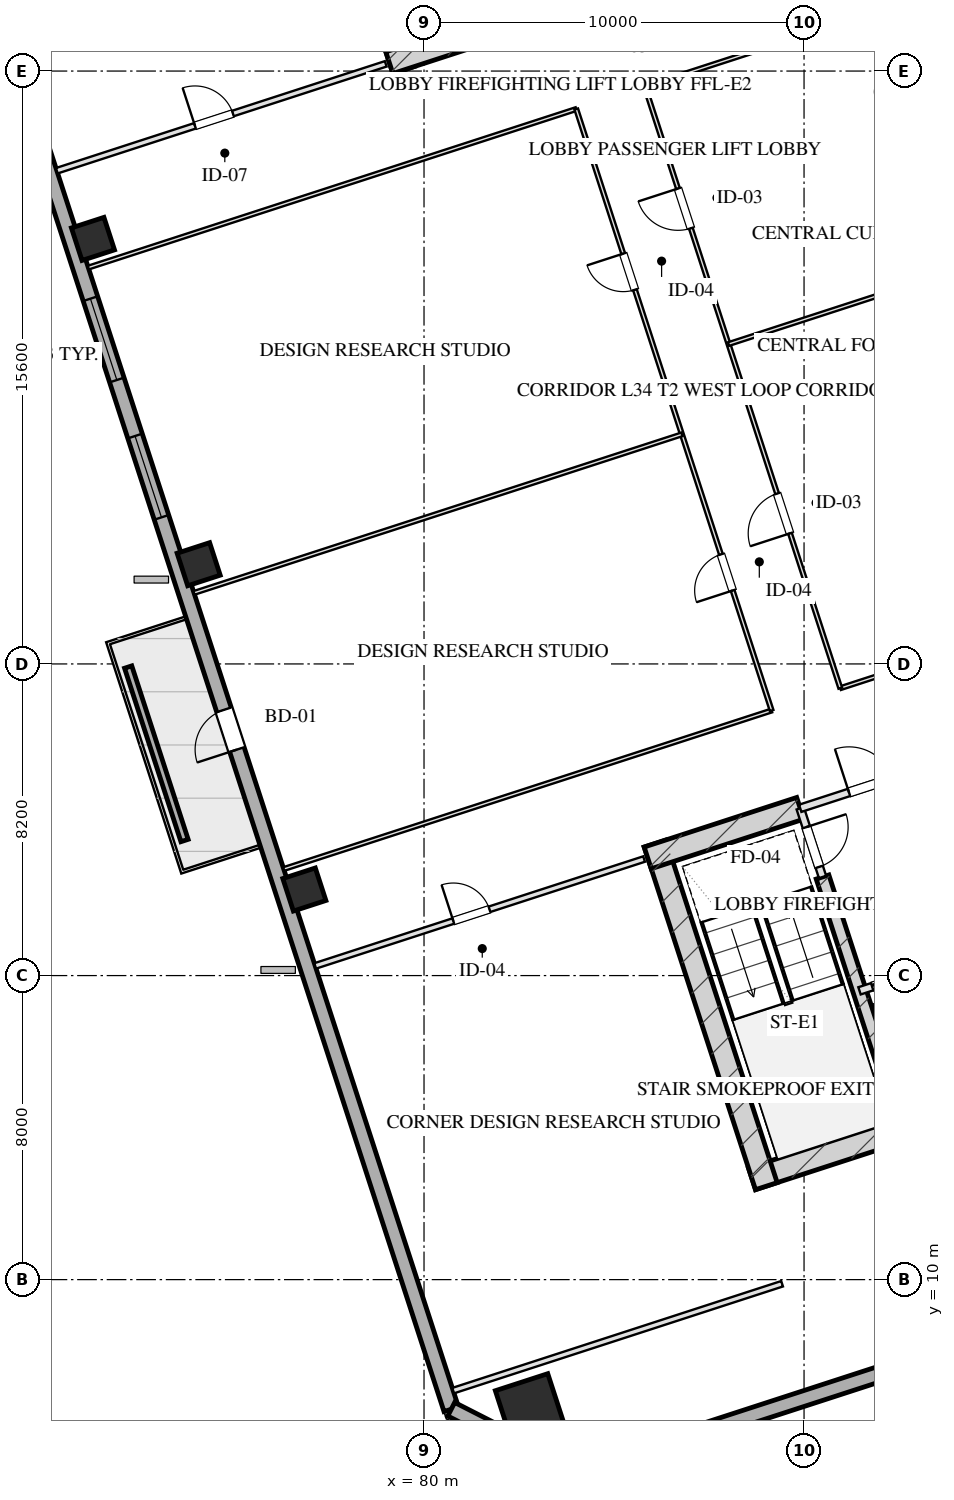
"""IFC4 building model, lengths in metres.
Left out: names, types, materials, properties, quantities, classifications, styles, units other than length and angle.
Written with IfcOpenShell. Run it as: python <this file> out.ifc"""

import sys

from ifc_helpers import new_model, si_unit, direction, frame, frame_2d, origin, origin_2d, place, context, subcontext, project, spatial, rectangle, hollow_rectangle, extrude, element, fill, save


model = new_model("IFC4")
c1 = context("Model", 3, precision=1e-05, world=origin(), true_north=direction((0.0, 1.0)))
c2 = subcontext(c1, "Body", "Model", "MODEL_VIEW")
j1 = project(units=[si_unit("LENGTHUNIT", "METRE"), si_unit("PLANEANGLEUNIT", "RADIAN")], contexts=[c1])
p1 = place(None, origin())
s1 = spatial("IfcSite", under=j1, at=p1, CompositionType="ELEMENT")
p2 = place(p1, origin())
s2 = spatial("IfcBuilding", under=s1, at=p2, CompositionType="ELEMENT")
p3 = place(p2, frame((0.0, 0.0, 131.1)))
s3 = spatial("IfcBuildingStorey", under=s2, at=p3, CompositionType="ELEMENT", Elevation=131.1)
p4 = place(p3, frame((88.63, 12.652, 0.0), z_axis=(0.0, 0.0, 1.0), x_axis=(0.95105714907, 0.309015046886, 0.0)))
e1 = element("IfcWall", 1, at=p4, inside=s3, PredefinedType="SHEAR", context=c2, shape_type="SweptSolid", body=[
    extrude(rectangle(XDim=16.4, YDim=0.6, at=frame_2d((8.2, 0.0))), origin(), (0.0, 0.0, 1.0), 3.45),
])
p5 = place(p3, frame((86.078, 21.475, 0.0), z_axis=(0.0, 0.0, 1.0), x_axis=(0.309017938678, -0.951056209472, 0.0)))
e2 = element("IfcWall", 2, at=p5, inside=s3, PredefinedType="SHEAR", context=c2, shape_type="SweptSolid", body=[
    extrude(rectangle(XDim=9.48, YDim=0.6, at=frame_2d((4.74, 0.0))), origin(), (0.0, 0.0, 1.0), 3.45),
])
p6 = place(p3, frame((90.486, 20.594, 0.0), z_axis=(0.0, 0.0, 1.0), x_axis=(0.309020428229, -0.951055400562, 0.0)))
e3 = element("IfcWall", 3, at=p6, inside=s3, PredefinedType="SHEAR", context=c2, shape_type="SweptSolid", body=[
    extrude(rectangle(XDim=6.98, YDim=0.35, at=frame_2d((3.49, 0.0))), origin(), (0.0, 0.0, 1.0), 3.45),
])
p7 = place(p3, frame((85.886, 21.097, 0.0), z_axis=(0.0, 0.0, 1.0), x_axis=(0.951068073652, 0.308981422225, 0.0)))
e4 = element("IfcWall", 4, at=p7, inside=s3, PredefinedType="SHEAR", context=c2, shape_type="SweptSolid", body=[
    extrude(rectangle(XDim=4.22, YDim=0.6, at=frame_2d((2.11, 0.0))), origin(), (0.0, 0.0, 1.0), 3.45),
])
p8 = place(p3, frame((79.466, 41.828, 0.0), z_axis=(0.0, 0.0, 1.0), x_axis=(-0.309041232772, 0.951048640421, 0.0)))
e5 = element("IfcWall", 5, at=p8, inside=s3, PredefinedType="SHEAR", context=c2, shape_type="SweptSolid", body=[
    extrude(rectangle(XDim=9.48, YDim=0.6, at=frame_2d((4.74, 0.0))), origin(), (0.0, 0.0, 1.0), 3.45),
])
p9 = place(p3, frame((79.087, 42.021, 0.0), z_axis=(0.0, 0.0, 1.0), x_axis=(0.951062550203, 0.3089984233, 0.0)))
e6 = element("IfcWall", 6, at=p9, inside=s3, PredefinedType="SHEAR", context=c2, shape_type="SweptSolid", body=[
    extrude(rectangle(XDim=4.22, YDim=0.6, at=frame_2d((2.11, 0.0))), origin(), (0.0, 0.0, 1.0), 3.45),
])
p10 = place(p3, frame((82.791, 6.612, 0.0), z_axis=(0.0, 0.0, 1.0), x_axis=(0.951056516295, 0.309016994375, 0.0)))
e7 = element("IfcColumn", 7, at=p10, inside=s3, PredefinedType="COLUMN", context=c2, shape_type="SweptSolid", body=[
    extrude(hollow_rectangle(XDim=1.45, YDim=1.45, WallThickness=0.05, at=origin_2d()), origin(), (0.0, 0.0, 1.0), 3.451),
])
for number, where, z_axis, x_axis in (
    (8, (76.851, 20.264, 0.0), (0.0, 0.0, 1.0), (0.951, 0.309, 0.0)),
    (9, (74.07, 28.824, 0.0), (0.0, 0.0, 1.0), (0.951, 0.309, 0.0)),
    (10, (71.289, 37.384, 0.0), (0.0, 0.0, 1.0), (0.951, 0.309, 0.0)),
):
    element("IfcColumn", number, at=place(p3, frame(where, z_axis=z_axis, x_axis=x_axis)), inside=s3, PredefinedType="COLUMN", context=c2, shape_type="SweptSolid", body=[
        extrude(hollow_rectangle(XDim=0.9, YDim=0.9, WallThickness=0.032, at=origin_2d()), origin(), (0.0, 0.0, 1.0), 3.451),
    ])
p11 = place(p3, frame((80.716, 6.59, 0.0), z_axis=(0.0, 0.0, 1.0), x_axis=(-0.309017542002, 0.95105633836, 0.0)))
e11 = element("IfcWall", 11, at=p11, inside=s3, PredefinedType="SOLIDWALL", context=c2, shape_type="SweptSolid", body=[
    extrude(rectangle(XDim=46.4, YDim=0.4, at=frame_2d((23.2, 0.0))), origin(), (0.0, 0.0, 1.0), 2.61),
])
p12 = place(p11, frame((24.675, 0.0, 0.75)))
e12 = element("IfcOpeningElement", 12, at=p12, cuts=e11, PredefinedType="OPENING", context=c2, shape_type="SweptSolid", body=[
    extrude(rectangle(XDim=2.25, YDim=1.46, at=frame_2d((1.125, 0.73))), frame((0.0, 0.21, 0.0), z_axis=(0.0, -1.0, 0.0), x_axis=(1.0, 0.0, 0.0)), (0.0, 0.0, 1.0), 0.42),
])
p13 = place(p11, frame((28.475, 0.0, 0.75)))
e13 = element("IfcOpeningElement", 13, at=p13, cuts=e11, PredefinedType="OPENING", context=c2, shape_type="SweptSolid", body=[
    extrude(rectangle(XDim=2.25, YDim=1.46, at=frame_2d((1.125, 0.73))), frame((0.0, 0.21, 0.0), z_axis=(0.0, -1.0, 0.0), x_axis=(1.0, 0.0, 0.0)), (0.0, 0.0, 1.0), 0.42),
])
p14 = place(p11, frame((18.25, 0.0, 0.0)))
e14 = element("IfcOpeningElement", 14, at=p14, cuts=e11, PredefinedType="OPENING", context=c2, shape_type="SweptSolid", body=[
    extrude(rectangle(XDim=1.1, YDim=2.15, at=frame_2d((0.55, 1.075))), frame((0.0, 0.21, 0.0), z_axis=(0.0, -1.0, 0.0), x_axis=(1.0, 0.0, 0.0)), (0.0, 0.0, 1.0), 0.42),
])
p15 = place(p3, frame((111.953, 14.005, 0.0), z_axis=(0.0, 0.0, 1.0), x_axis=(-0.95105505922, -0.309021478754, 0.0)))
e15 = element("IfcWall", 15, at=p15, inside=s3, PredefinedType="SOLIDWALL", context=c2, shape_type="SweptSolid", body=[
    extrude(rectangle(XDim=29.4, YDim=0.4, at=frame_2d((14.7, 0.0))), origin(), (0.0, 0.0, 1.0), 2.61),
])
p16 = place(p3, frame((83.992, 4.92, 0.0), z_axis=(0.0, 0.0, 1.0), x_axis=(-0.891001999643, 0.45399937955, 0.0)))
e16 = element("IfcWall", 16, at=p16, inside=s3, PredefinedType="SOLIDWALL", context=c2, shape_type="SweptSolid", body=[
    extrude(rectangle(XDim=3.677, YDim=0.4, at=frame_2d((1.839, 0.0))), origin(), (0.0, 0.0, 1.0), 2.61),
])
p17 = place(p3, frame((73.698, 21.553, 0.0), z_axis=(0.0, 0.0, 1.0), x_axis=(-0.309032019345, 0.951051634255, 0.0)))
e17 = element("IfcWall", 17, at=p17, inside=s3, PredefinedType="PARAPET", context=c2, shape_type="SweptSolid", body=[
    extrude(rectangle(XDim=4.8, YDim=0.2, at=frame_2d((2.4, 0.0))), origin(), (0.0, 0.0, 1.0), 0.75),
])
p18 = place(p3, frame((89.899, 22.401, 0.0), z_axis=(0.0, 0.0, 1.0), x_axis=(0.308932062672, -0.951084108086, 0.0)))
e18 = element("IfcWall", 18, at=p18, inside=s3, PredefinedType="PARTITIONING", context=c2, shape_type="SweptSolid", body=[
    extrude(rectangle(XDim=1.9, YDim=0.2, at=frame_2d((0.95, 0.0))), origin(), (0.0, 0.0, 1.0), 3.175),
])
p19 = place(p18, frame((0.52, 0.0, 0.0)))
e19 = element("IfcOpeningElement", 19, at=p19, cuts=e18, PredefinedType="OPENING", context=c2, shape_type="SweptSolid", body=[
    extrude(rectangle(XDim=1.1, YDim=2.05, at=frame_2d((0.55, 1.025))), frame((0.0, 0.11, 0.0), z_axis=(0.0, -1.0, 0.0), x_axis=(1.0, 0.0, 0.0)), (0.0, 0.0, 1.0), 0.22),
])
p20 = place(p3, frame((89.899, 22.401, 0.0), z_axis=(0.0, 0.0, 1.0), x_axis=(0.951046716504, 0.309047153403, 0.0)))
e20 = element("IfcWall", 20, at=p20, inside=s3, PredefinedType="PARTITIONING", context=c2, shape_type="SweptSolid", body=[
    extrude(rectangle(XDim=3.83, YDim=0.2, at=frame_2d((1.915, 0.0))), origin(), (0.0, 0.0, 1.0), 3.175),
])
p21 = place(p20, frame((1.35, 0.0, 0.0)))
e21 = element("IfcOpeningElement", 21, at=p21, cuts=e20, PredefinedType="OPENING", context=c2, shape_type="SweptSolid", body=[
    extrude(rectangle(XDim=1.2, YDim=2.05, at=frame_2d((0.6, 1.025))), frame((0.0, 0.11, 0.0), z_axis=(0.0, -1.0, 0.0), x_axis=(1.0, 0.0, 0.0)), (0.0, 0.0, 1.0), 0.22),
])
p22 = place(p3, frame((91.46, 17.598, 0.0), z_axis=(0.0, 0.0, 1.0), x_axis=(0.951062257173, 0.308999325213, 0.0)))
e22 = element("IfcWall", 22, at=p22, inside=s3, PredefinedType="PARTITIONING", context=c2, shape_type="SweptSolid", body=[
    extrude(rectangle(XDim=2.1, YDim=0.2, at=frame_2d((1.05, 0.0))), origin(), (0.0, 0.0, 1.0), 3.175),
])
p23 = place(p22, frame((0.35, 0.0, 0.0)))
e23 = element("IfcOpeningElement", 23, at=p23, cuts=e22, PredefinedType="OPENING", context=c2, shape_type="SweptSolid", body=[
    extrude(rectangle(XDim=1.1, YDim=2.05, at=frame_2d((0.55, 1.025))), frame((0.0, 0.11, 0.0), z_axis=(0.0, -1.0, 0.0), x_axis=(1.0, 0.0, 0.0)), (0.0, 0.0, 1.0), 0.22),
])
p24 = place(p3, frame((80.767, 7.079, 0.0), z_axis=(0.0, 0.0, 1.0), x_axis=(0.951057133767, 0.309015093986, 0.0)))
e24 = element("IfcWall", 24, at=p24, inside=s3, PredefinedType="PARTITIONING", context=c2, shape_type="SweptSolid", body=[
    extrude(rectangle(XDim=9.1, YDim=0.15, at=frame_2d((4.55, 0.0))), origin(), (0.0, 0.0, 1.0), 3.175),
])
p25 = place(p3, frame((77.136, 18.254, 0.0), z_axis=(0.0, 0.0, 1.0), x_axis=(0.951057133767, 0.309015093986, 0.0)))
e25 = element("IfcWall", 25, at=p25, inside=s3, PredefinedType="PARTITIONING", context=c2, shape_type="SweptSolid", body=[
    extrude(rectangle(XDim=9.1, YDim=0.15, at=frame_2d((4.55, 0.0))), origin(), (0.0, 0.0, 1.0), 2.15),
])
p26 = place(p25, frame((3.822, 0.0, 0.0)))
e26 = element("IfcOpeningElement", 26, at=p26, cuts=e25, PredefinedType="OPENING", context=c2, shape_type="SweptSolid", body=[
    extrude(rectangle(XDim=1.0, YDim=2.05, at=frame_2d((0.5, 1.025))), frame((0.0, 0.085, 0.0), z_axis=(0.0, -1.0, 0.0), x_axis=(1.0, 0.0, 0.0)), (0.0, 0.0, 1.0), 0.17),
])
p27 = place(p3, frame((70.338, 39.177, 0.0), z_axis=(0.0, 0.0, 1.0), x_axis=(0.951059695568, 0.309007209409, 0.0)))
e27 = element("IfcWall", 27, at=p27, inside=s3, PredefinedType="PARTITIONING", context=c2, shape_type="SweptSolid", body=[
    extrude(rectangle(XDim=9.1, YDim=0.15, at=frame_2d((4.55, 0.0))), origin(), (0.0, 0.0, 1.0), 2.15),
])
p28 = place(p27, frame((3.822, 0.0, 0.0)))
e28 = element("IfcOpeningElement", 28, at=p28, cuts=e27, PredefinedType="OPENING", context=c2, shape_type="SweptSolid", body=[
    extrude(rectangle(XDim=1.05, YDim=2.05, at=frame_2d((0.525, 1.025))), frame((0.0, 0.085, 0.0), z_axis=(0.0, -1.0, 0.0), x_axis=(1.0, 0.0, 0.0)), (0.0, 0.0, 1.0), 0.17),
])
p29 = place(p3, frame((76.308, 20.803, 0.0), z_axis=(0.0, 0.0, 1.0), x_axis=(0.951054001411, 0.309024734286, 0.0)))
e29 = element("IfcWall", 29, at=p29, inside=s3, PredefinedType="MOVABLE", context=c2, shape_type="SweptSolid", body=[
    extrude(rectangle(XDim=13.5, YDim=0.1, at=frame_2d((6.75, 0.0))), origin(), (0.0, 0.0, 1.0), 3.175),
])
p30 = place(p3, frame((90.954, 25.562, 0.0), z_axis=(0.0, 0.0, 1.0), x_axis=(0.951052398814, 0.309029666393, 0.0)))
e30 = element("IfcWall", 30, at=p30, inside=s3, PredefinedType="MOVABLE", context=c2, shape_type="SweptSolid", body=[
    extrude(rectangle(XDim=9.2, YDim=0.1, at=frame_2d((4.6, 0.0))), origin(), (0.0, 0.0, 1.0), 3.175),
])
p31 = place(p3, frame((71.166, 36.629, 0.0), z_axis=(0.0, 0.0, 1.0), x_axis=(0.951057589409, 0.309013691651, 0.0)))
e31 = element("IfcWall", 31, at=p31, inside=s3, PredefinedType="MOVABLE", context=c2, shape_type="SweptSolid", body=[
    extrude(rectangle(XDim=13.5, YDim=0.1, at=frame_2d((6.75, 0.0))), origin(), (0.0, 0.0, 1.0), 3.175),
])
p32 = place(p3, frame((85.812, 41.387, 0.0), z_axis=(0.0, 0.0, 1.0), x_axis=(0.951054933035, 0.309021867106, 0.0)))
e32 = element("IfcWall", 32, at=p32, inside=s3, PredefinedType="MOVABLE", context=c2, shape_type="SweptSolid", body=[
    extrude(rectangle(XDim=9.2, YDim=0.1, at=frame_2d((4.6, 0.0))), origin(), (0.0, 0.0, 1.0), 3.175),
])
p33 = place(p3, frame((89.147, 24.975, 0.0), z_axis=(0.0, 0.0, 1.0), x_axis=(-0.309022042254, 0.951054876125, 0.0)))
e33 = element("IfcWall", 33, at=p33, inside=s3, PredefinedType="MOVABLE", context=c2, shape_type="SweptSolid", body=[
    extrude(rectangle(XDim=16.64, YDim=0.1, at=frame_2d((8.32, 0.0))), origin(), (0.0, 0.0, 1.0), 3.175),
])
p34 = place(p33, frame((3.32, 0.0, 0.0)))
e34 = element("IfcOpeningElement", 34, at=p34, cuts=e33, PredefinedType="OPENING", context=c2, shape_type="SweptSolid", body=[
    extrude(rectangle(XDim=1.0, YDim=2.05, at=frame_2d((0.5, 1.025))), frame((0.0, 0.06, 0.0), z_axis=(0.0, -1.0, 0.0), x_axis=(1.0, 0.0, 0.0)), (0.0, 0.0, 1.0), 0.12),
])
p35 = place(p33, frame((11.64, 0.0, 0.0)))
e35 = element("IfcOpeningElement", 35, at=p35, cuts=e33, PredefinedType="OPENING", context=c2, shape_type="SweptSolid", body=[
    extrude(rectangle(XDim=1.0, YDim=2.05, at=frame_2d((0.5, 1.025))), frame((0.0, 0.06, 0.0), z_axis=(0.0, -1.0, 0.0), x_axis=(1.0, 0.0, 0.0)), (0.0, 0.0, 1.0), 0.12),
])
p36 = place(p3, frame((90.954, 25.562, 0.0), z_axis=(0.0, 0.0, 1.0), x_axis=(-0.30901773025, 0.951056277195, 0.0)))
e36 = element("IfcWall", 36, at=p36, inside=s3, PredefinedType="MOVABLE", context=c2, shape_type="SweptSolid", body=[
    extrude(rectangle(XDim=16.64, YDim=0.1, at=frame_2d((8.32, 0.0))), origin(), (0.0, 0.0, 1.0), 3.175),
])
p37 = place(p36, frame((4.284, 0.0, 0.0)))
e37 = element("IfcOpeningElement", 37, at=p37, cuts=e36, PredefinedType="OPENING", context=c2, shape_type="SweptSolid", body=[
    extrude(rectangle(XDim=1.1, YDim=2.05, at=frame_2d((0.55, 1.025))), frame((0.0, 0.06, 0.0), z_axis=(0.0, -1.0, 0.0), x_axis=(1.0, 0.0, 0.0)), (0.0, 0.0, 1.0), 0.12),
])
p38 = place(p36, frame((12.724, 0.0, 0.0)))
e38 = element("IfcOpeningElement", 38, at=p38, cuts=e36, PredefinedType="OPENING", context=c2, shape_type="SweptSolid", body=[
    extrude(rectangle(XDim=1.1, YDim=2.05, at=frame_2d((0.55, 1.025))), frame((0.0, 0.06, 0.0), z_axis=(0.0, -1.0, 0.0), x_axis=(1.0, 0.0, 0.0)), (0.0, 0.0, 1.0), 0.12),
])
p39 = place(p3, frame((88.012, 34.616, 0.0), z_axis=(0.0, 0.0, 1.0), x_axis=(0.951054933035, 0.309021867106, 0.0)))
e39 = element("IfcWall", 39, at=p39, inside=s3, PredefinedType="MOVABLE", context=c2, shape_type="SweptSolid", body=[
    extrude(rectangle(XDim=9.2, YDim=0.1, at=frame_2d((4.6, 0.0))), origin(), (0.0, 0.0, 1.0), 3.175),
])
p40 = place(p3, frame((73.947, 28.069, 0.0), z_axis=(0.0, 0.0, 1.0), x_axis=(0.951059316265, 0.309008376821, 0.0)))
e40 = element("IfcWall", 40, at=p40, inside=s3, PredefinedType="MOVABLE", context=c2, shape_type="SweptSolid", body=[
    extrude(rectangle(XDim=13.5, YDim=0.1, at=frame_2d((6.75, 0.0))), origin(), (0.0, 0.0, 1.0), 3.175),
])
p41 = place(p12, origin())
e41 = element("IfcWindow", 41, at=p41, inside=s3, PartitioningType="TRIPLE_PANEL_VERTICAL", PredefinedType="WINDOW", context=c2, shape_type="SweptSolid", body=[
    extrude(rectangle(XDim=2.25, YDim=1.46, at=frame_2d((1.125, 0.73))), frame((0.0, 0.03, 0.0), z_axis=(0.0, -1.0, 0.0), x_axis=(1.0, 0.0, 0.0)), (0.0, 0.0, 1.0), 0.06),
])
fill(e12, e41)
p42 = place(p13, origin())
e42 = element("IfcWindow", 42, at=p42, inside=s3, PartitioningType="TRIPLE_PANEL_VERTICAL", PredefinedType="WINDOW", context=c2, shape_type="SweptSolid", body=[
    extrude(rectangle(XDim=2.25, YDim=1.46, at=frame_2d((1.125, 0.73))), frame((0.0, 0.03, 0.0), z_axis=(0.0, -1.0, 0.0), x_axis=(1.0, 0.0, 0.0)), (0.0, 0.0, 1.0), 0.06),
])
fill(e13, e42)
p43 = place(p14, origin())
e43 = element("IfcDoor", 43, at=p43, inside=s3, OperationType="SINGLE_SWING_LEFT", PredefinedType="DOOR", context=c2, shape_type="SweptSolid", body=[
    extrude(rectangle(XDim=1.1, YDim=2.15, at=frame_2d((0.55, 1.075))), frame((0.0, 0.025, 0.0), z_axis=(0.0, -1.0, 0.0), x_axis=(1.0, 0.0, 0.0)), (0.0, 0.0, 1.0), 0.05),
])
fill(e14, e43)
p44 = place(p19, origin())
e44 = element("IfcDoor", 44, at=p44, inside=s3, OperationType="SINGLE_SWING_LEFT", PredefinedType="DOOR", context=c2, shape_type="SweptSolid", body=[
    extrude(rectangle(XDim=1.1, YDim=2.05, at=frame_2d((0.55, 1.025))), frame((0.0, 0.025, 0.0), z_axis=(0.0, -1.0, 0.0), x_axis=(1.0, 0.0, 0.0)), (0.0, 0.0, 1.0), 0.05),
])
fill(e19, e44)
p45 = place(p21, origin())
e45 = element("IfcDoor", 45, at=p45, inside=s3, OperationType="SINGLE_SWING_LEFT", PredefinedType="DOOR", context=c2, shape_type="SweptSolid", body=[
    extrude(rectangle(XDim=1.2, YDim=2.05, at=frame_2d((0.6, 1.025))), frame((0.0, 0.025, 0.0), z_axis=(0.0, -1.0, 0.0), x_axis=(1.0, 0.0, 0.0)), (0.0, 0.0, 1.0), 0.05),
])
fill(e21, e45)
p46 = place(p23, origin())
e46 = element("IfcDoor", 46, at=p46, inside=s3, OperationType="DOUBLE_DOOR_SLIDING", PredefinedType="DOOR", context=c2, shape_type="SweptSolid", body=[
    extrude(rectangle(XDim=1.1, YDim=2.05, at=frame_2d((0.55, 1.025))), frame((0.0, 0.025, 0.0), z_axis=(0.0, -1.0, 0.0), x_axis=(1.0, 0.0, 0.0)), (0.0, 0.0, 1.0), 0.05),
])
fill(e23, e46)
p47 = place(p26, origin())
e47 = element("IfcDoor", 47, at=p47, inside=s3, OperationType="SINGLE_SWING_LEFT", PredefinedType="DOOR", context=c2, shape_type="SweptSolid", body=[
    extrude(rectangle(XDim=1.0, YDim=2.05, at=frame_2d((0.5, 1.025))), frame((0.0, 0.025, 0.0), z_axis=(0.0, -1.0, 0.0), x_axis=(1.0, 0.0, 0.0)), (0.0, 0.0, 1.0), 0.05),
])
fill(e26, e47)
p48 = place(p28, origin())
e48 = element("IfcDoor", 48, at=p48, inside=s3, OperationType="SINGLE_SWING_LEFT", PredefinedType="DOOR", context=c2, shape_type="SweptSolid", body=[
    extrude(rectangle(XDim=1.05, YDim=2.05, at=frame_2d((0.525, 1.025))), frame((0.0, 0.025, 0.0), z_axis=(0.0, -1.0, 0.0), x_axis=(1.0, 0.0, 0.0)), (0.0, 0.0, 1.0), 0.05),
])
fill(e28, e48)
p49 = place(p34, origin())
e49 = element("IfcDoor", 49, at=p49, inside=s3, OperationType="SINGLE_SWING_LEFT", PredefinedType="DOOR", context=c2, shape_type="SweptSolid", body=[
    extrude(rectangle(XDim=1.0, YDim=2.05, at=frame_2d((0.5, 1.025))), frame((0.0, 0.025, 0.0), z_axis=(0.0, -1.0, 0.0), x_axis=(1.0, 0.0, 0.0)), (0.0, 0.0, 1.0), 0.05),
])
fill(e34, e49)
p50 = place(p35, origin())
e50 = element("IfcDoor", 50, at=p50, inside=s3, OperationType="SINGLE_SWING_RIGHT", PredefinedType="DOOR", context=c2, shape_type="SweptSolid", body=[
    extrude(rectangle(XDim=1.0, YDim=2.05, at=frame_2d((0.5, 1.025))), frame((0.0, 0.025, 0.0), z_axis=(0.0, -1.0, 0.0), x_axis=(1.0, 0.0, 0.0)), (0.0, 0.0, 1.0), 0.05),
])
fill(e35, e50)
p51 = place(p37, origin())
e51 = element("IfcDoor", 51, at=p51, inside=s3, OperationType="SINGLE_SWING_LEFT", PredefinedType="DOOR", context=c2, shape_type="SweptSolid", body=[
    extrude(rectangle(XDim=1.1, YDim=2.05, at=frame_2d((0.55, 1.025))), frame((0.0, 0.025, 0.0), z_axis=(0.0, -1.0, 0.0), x_axis=(1.0, 0.0, 0.0)), (0.0, 0.0, 1.0), 0.05),
])
fill(e37, e51)
p52 = place(p38, origin())
e52 = element("IfcDoor", 52, at=p52, inside=s3, OperationType="SINGLE_SWING_RIGHT", PredefinedType="DOOR", context=c2, shape_type="SweptSolid", body=[
    extrude(rectangle(XDim=1.1, YDim=2.05, at=frame_2d((0.55, 1.025))), frame((0.0, 0.025, 0.0), z_axis=(0.0, -1.0, 0.0), x_axis=(1.0, 0.0, 0.0)), (0.0, 0.0, 1.0), 0.05),
])
fill(e38, e52)
save(model, sys.argv[1])
